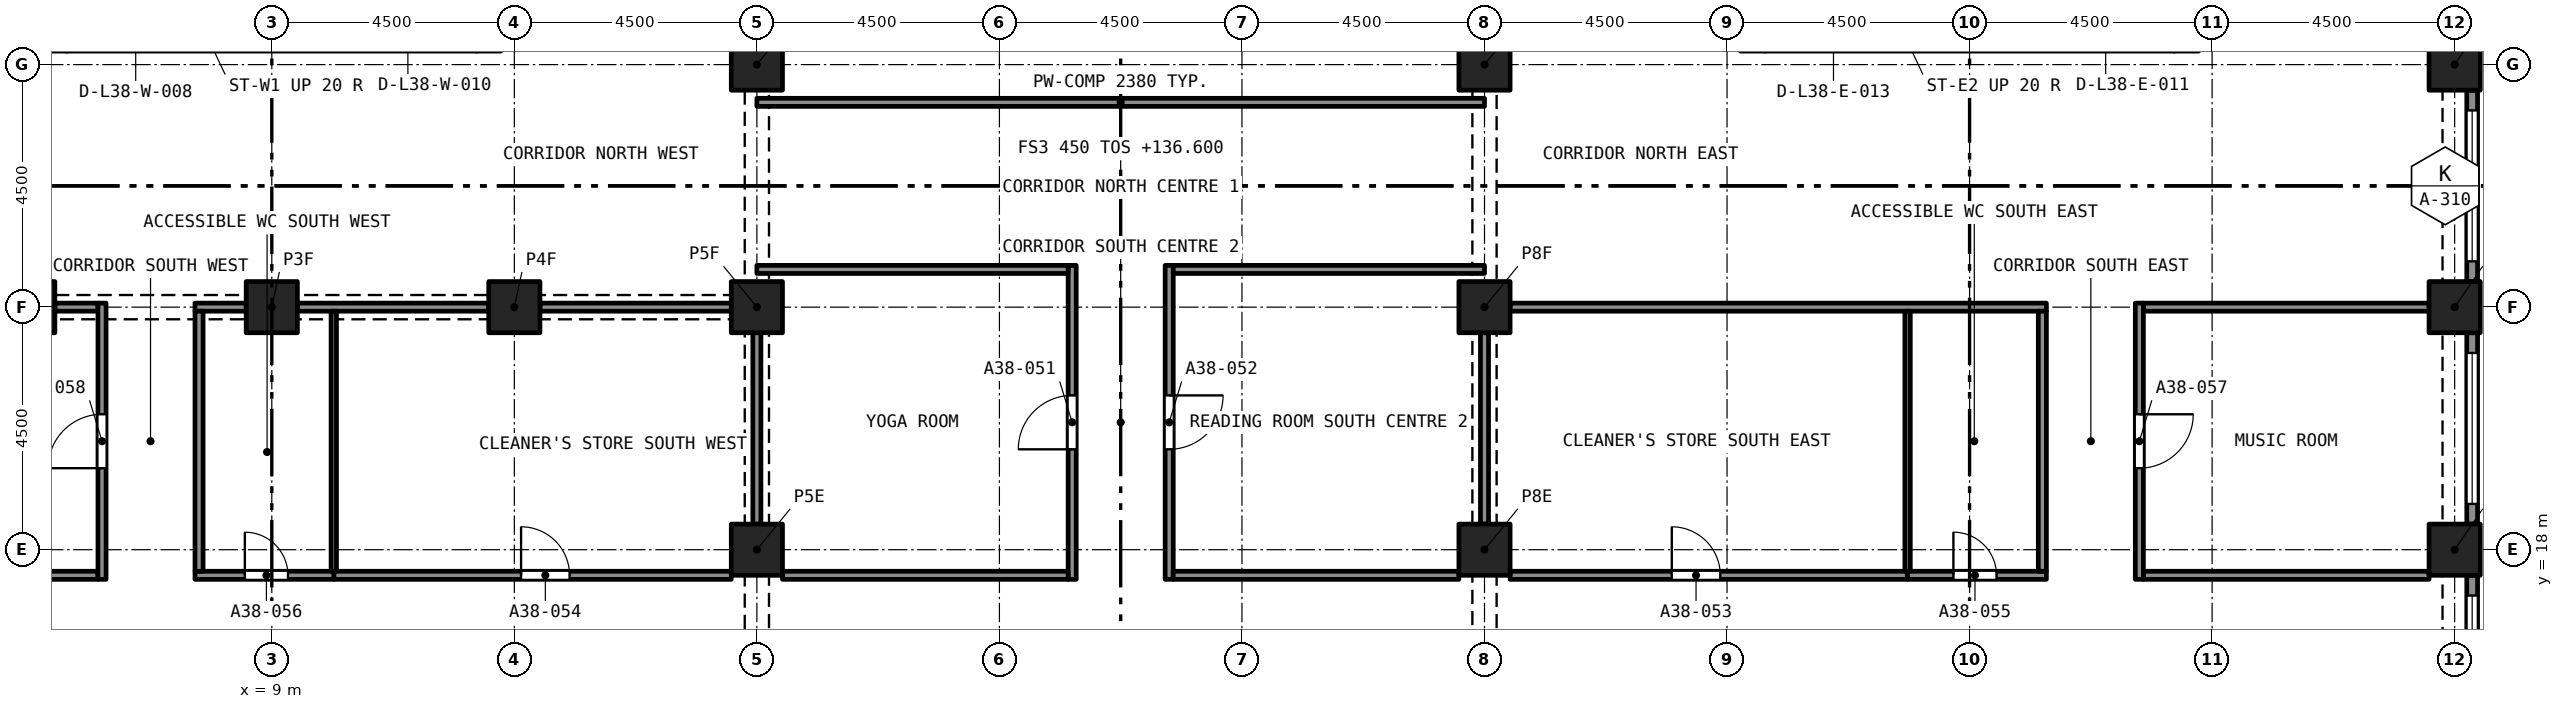
"""IFC4 building model, lengths in metres.
Left out: names, types, materials, properties, quantities, classifications, styles, units other than length and angle.
Written with IfcOpenShell. Run it as: python <this file> out.ifc"""

import sys

from ifc_helpers import new_model, si_unit, direction, frame, frame_2d, origin, origin_2d, place, context, subcontext, project, spatial, rectangle, extrude, element, fill, save


model = new_model("IFC4")
c1 = context("Model", 3, precision=1e-05, world=origin(), true_north=direction((0.0, 1.0)))
c2 = subcontext(c1, "Body", "Model", "MODEL_VIEW")
j1 = project(units=[si_unit("LENGTHUNIT", "METRE"), si_unit("PLANEANGLEUNIT", "RADIAN")], contexts=[c1])
p1 = place(None, origin())
s1 = spatial("IfcSite", under=j1, at=p1, CompositionType="ELEMENT")
p2 = place(p1, origin())
s2 = spatial("IfcBuilding", under=s1, at=p2, CompositionType="ELEMENT")
p3 = place(p2, frame((0.0, 0.0, 136.6)))
s3 = spatial("IfcBuildingStorey", under=s2, at=p3, CompositionType="ELEMENT", Elevation=136.6)
for number, where, z_axis, x_axis in (
    (1, (18.0, 18.0, 0.0), (0.0, 0.0, 1.0), (1.0, 0.0, 0.0)),
    (2, (31.5, 18.0, 0.0), (0.0, 0.0, 1.0), (1.0, 0.0, 0.0)),
    (3, (49.5, 18.0, 0.0), (0.0, 0.0, 1.0), (1.0, 0.0, 0.0)),
    (4, (4.5, 22.5, 0.0), (0.0, 0.0, 1.0), (1.0, 0.0, 0.0)),
    (5, (9.0, 22.5, 0.0), (0.0, 0.0, 1.0), (1.0, 0.0, 0.0)),
    (6, (13.5, 22.5, 0.0), (0.0, 0.0, 1.0), (1.0, 0.0, 0.0)),
    (7, (18.0, 22.5, 0.0), (0.0, 0.0, 1.0), (1.0, 0.0, 0.0)),
    (8, (31.5, 22.5, 0.0), (0.0, 0.0, 1.0), (1.0, 0.0, 0.0)),
    (9, (49.5, 22.5, 0.0), (0.0, 0.0, 1.0), (1.0, 0.0, 0.0)),
    (10, (18.0, 27.0, 0.0), (0.0, 0.0, 1.0), (1.0, 0.0, 0.0)),
    (11, (31.5, 27.0, 0.0), (0.0, 0.0, 1.0), (1.0, 0.0, 0.0)),
    (12, (49.5, 27.0, 0.0), (0.0, 0.0, 1.0), (1.0, 0.0, 0.0)),
):
    element("IfcColumn", number, at=place(p3, frame(where, z_axis=z_axis, x_axis=x_axis)), inside=s3, PredefinedType="COLUMN", context=c2, shape_type="SweptSolid", body=[
        extrude(rectangle(XDim=0.95, YDim=0.95, at=origin_2d()), origin(), (0.0, 0.0, 1.0), 3.2),
    ])
p4 = place(p3, frame((49.825, 17.525, 0.0), z_axis=(0.0, 0.0, 1.0), x_axis=(0.0, -1.0, 0.0)))
e13 = element("IfcWall", 13, at=p4, inside=s3, PredefinedType="SOLIDWALL", context=c2, shape_type="SweptSolid", body=[
    extrude(rectangle(XDim=3.55, YDim=0.2, at=frame_2d((1.775, 0.0))), origin(), (0.0, 0.0, 1.0), 3.2),
])
p5 = place(p4, frame((0.375, 0.0, 0.45)))
e14 = element("IfcOpeningElement", 14, at=p5, cuts=e13, PredefinedType="OPENING", context=c2, shape_type="SweptSolid", body=[
    extrude(rectangle(XDim=2.8, YDim=1.95, at=frame_2d((1.4, 0.975))), frame((0.0, 0.11, 0.0), z_axis=(0.0, -1.0, 0.0), x_axis=(1.0, 0.0, 0.0)), (0.0, 0.0, 1.0), 0.22),
])
p6 = place(p3, frame((49.825, 22.025, 0.0), z_axis=(0.0, 0.0, 1.0), x_axis=(0.0, -1.0, 0.0)))
e15 = element("IfcWall", 15, at=p6, inside=s3, PredefinedType="SOLIDWALL", context=c2, shape_type="SweptSolid", body=[
    extrude(rectangle(XDim=3.55, YDim=0.2, at=frame_2d((1.775, 0.0))), origin(), (0.0, 0.0, 1.0), 3.2),
])
p7 = place(p6, frame((0.375, 0.0, 0.45)))
e16 = element("IfcOpeningElement", 16, at=p7, cuts=e15, PredefinedType="OPENING", context=c2, shape_type="SweptSolid", body=[
    extrude(rectangle(XDim=2.8, YDim=1.95, at=frame_2d((1.4, 0.975))), frame((0.0, 0.11, 0.0), z_axis=(0.0, -1.0, 0.0), x_axis=(1.0, 0.0, 0.0)), (0.0, 0.0, 1.0), 0.22),
])
p8 = place(p3, frame((49.825, 26.525, 0.0), z_axis=(0.0, 0.0, 1.0), x_axis=(0.0, -1.0, 0.0)))
e17 = element("IfcWall", 17, at=p8, inside=s3, PredefinedType="SOLIDWALL", context=c2, shape_type="SweptSolid", body=[
    extrude(rectangle(XDim=3.55, YDim=0.2, at=frame_2d((1.775, 0.0))), origin(), (0.0, 0.0, 1.0), 3.2),
])
p9 = place(p8, frame((0.375, 0.0, 0.45)))
e18 = element("IfcOpeningElement", 18, at=p9, cuts=e17, PredefinedType="OPENING", context=c2, shape_type="SweptSolid", body=[
    extrude(rectangle(XDim=2.8, YDim=1.95, at=frame_2d((1.4, 0.975))), frame((0.0, 0.11, 0.0), z_axis=(0.0, -1.0, 0.0), x_axis=(1.0, 0.0, 0.0)), (0.0, 0.0, 1.0), 0.22),
])
p10 = place(p3, frame((23.85, 17.45, 0.0), z_axis=(0.0, 0.0, 1.0), x_axis=(0.0, 1.0, 0.0)))
e19 = element("IfcWall", 19, at=p10, inside=s3, PredefinedType="PARTITIONING", context=c2, shape_type="SweptSolid", body=[
    extrude(rectangle(XDim=5.825, YDim=0.15, at=frame_2d((2.913, 0.0))), origin(), (0.0, 0.0, 1.0), 2.75),
])
p11 = place(p10, frame((2.413, 0.0, 0.0)))
e20 = element("IfcOpeningElement", 20, at=p11, cuts=e19, PredefinedType="OPENING", context=c2, shape_type="SweptSolid", body=[
    extrude(rectangle(XDim=1.0, YDim=2.1, at=frame_2d((0.5, 1.05))), frame((0.0, 0.085, 0.0), z_axis=(0.0, -1.0, 0.0), x_axis=(1.0, 0.0, 0.0)), (0.0, 0.0, 1.0), 0.17),
])
p12 = place(p3, frame((25.65, 23.275, 0.0), z_axis=(0.0, 0.0, 1.0), x_axis=(0.0, -1.0, 0.0)))
e21 = element("IfcWall", 21, at=p12, inside=s3, PredefinedType="PARTITIONING", context=c2, shape_type="SweptSolid", body=[
    extrude(rectangle(XDim=5.825, YDim=0.15, at=frame_2d((2.913, 0.0))), origin(), (0.0, 0.0, 1.0), 2.75),
])
p13 = place(p12, frame((2.413, 0.0, 0.0)))
e22 = element("IfcOpeningElement", 22, at=p13, cuts=e21, PredefinedType="OPENING", context=c2, shape_type="SweptSolid", body=[
    extrude(rectangle(XDim=1.0, YDim=2.1, at=frame_2d((0.5, 1.05))), frame((0.0, 0.085, 0.0), z_axis=(0.0, -1.0, 0.0), x_axis=(1.0, 0.0, 0.0)), (0.0, 0.0, 1.0), 0.17),
])
for number, where, z_axis, x_axis in (
    (23, (18.475, 17.525, 0.0), (0.0, 0.0, 1.0), (1.0, 0.0, 0.0)),
    (24, (25.725, 17.525, 0.0), (0.0, 0.0, 1.0), (1.0, 0.0, 0.0)),
):
    element("IfcWall", number, at=place(p3, frame(where, z_axis=z_axis, x_axis=x_axis)), inside=s3, PredefinedType="PARTITIONING", context=c2, shape_type="SweptSolid", body=[
        extrude(rectangle(XDim=5.3, YDim=0.15, at=frame_2d((2.65, 0.0))), origin(), (0.0, 0.0, 1.0), 2.75),
    ])
p14 = place(p3, frame((31.975, 17.525, 0.0), z_axis=(0.0, 0.0, 1.0), x_axis=(1.0, 0.0, 0.0)))
e25 = element("IfcWall", 25, at=p14, inside=s3, PredefinedType="PARTITIONING", context=c2, shape_type="SweptSolid", body=[
    extrude(rectangle(XDim=7.375, YDim=0.15, at=frame_2d((3.688, 0.0))), origin(), (0.0, 0.0, 1.0), 2.9),
])
p15 = place(p14, frame((3.0, 0.0, 0.0)))
e26 = element("IfcOpeningElement", 26, at=p15, cuts=e25, PredefinedType="OPENING", context=c2, shape_type="SweptSolid", body=[
    extrude(rectangle(XDim=0.9, YDim=2.1, at=frame_2d((0.45, 1.05))), frame((0.0, 0.085, 0.0), z_axis=(0.0, -1.0, 0.0), x_axis=(1.0, 0.0, 0.0)), (0.0, 0.0, 1.0), 0.17),
])
p16 = place(p3, frame((10.15, 17.525, 0.0), z_axis=(0.0, 0.0, 1.0), x_axis=(1.0, 0.0, 0.0)))
e27 = element("IfcWall", 27, at=p16, inside=s3, PredefinedType="PARTITIONING", context=c2, shape_type="SweptSolid", body=[
    extrude(rectangle(XDim=7.375, YDim=0.15, at=frame_2d((3.688, 0.0))), origin(), (0.0, 0.0, 1.0), 2.9),
])
p17 = place(p16, frame((3.475, 0.0, 0.0)))
e28 = element("IfcOpeningElement", 28, at=p17, cuts=e27, PredefinedType="OPENING", context=c2, shape_type="SweptSolid", body=[
    extrude(rectangle(XDim=0.9, YDim=2.1, at=frame_2d((0.45, 1.05))), frame((0.0, 0.085, 0.0), z_axis=(0.0, -1.0, 0.0), x_axis=(1.0, 0.0, 0.0)), (0.0, 0.0, 1.0), 0.17),
])
p18 = place(p3, frame((39.35, 17.525, 0.0), z_axis=(0.0, 0.0, 1.0), x_axis=(1.0, 0.0, 0.0)))
e29 = element("IfcWall", 29, at=p18, inside=s3, PredefinedType="PARTITIONING", context=c2, shape_type="SweptSolid", body=[
    extrude(rectangle(XDim=2.575, YDim=0.15, at=frame_2d((1.288, 0.0))), origin(), (0.0, 0.0, 1.0), 2.9),
])
p19 = place(p18, frame((0.85, 0.0, 0.0)))
e30 = element("IfcOpeningElement", 30, at=p19, cuts=e29, PredefinedType="OPENING", context=c2, shape_type="SweptSolid", body=[
    extrude(rectangle(XDim=0.8, YDim=2.1, at=frame_2d((0.4, 1.05))), frame((0.0, 0.085, 0.0), z_axis=(0.0, -1.0, 0.0), x_axis=(1.0, 0.0, 0.0)), (0.0, 0.0, 1.0), 0.17),
])
p20 = place(p3, frame((7.575, 17.525, 0.0), z_axis=(0.0, 0.0, 1.0), x_axis=(1.0, 0.0, 0.0)))
e31 = element("IfcWall", 31, at=p20, inside=s3, PredefinedType="PARTITIONING", context=c2, shape_type="SweptSolid", body=[
    extrude(rectangle(XDim=2.575, YDim=0.15, at=frame_2d((1.288, 0.0))), origin(), (0.0, 0.0, 1.0), 2.9),
])
p21 = place(p20, frame((0.925, 0.0, 0.0)))
e32 = element("IfcOpeningElement", 32, at=p21, cuts=e31, PredefinedType="OPENING", context=c2, shape_type="SweptSolid", body=[
    extrude(rectangle(XDim=0.8, YDim=2.1, at=frame_2d((0.4, 1.05))), frame((0.0, 0.085, 0.0), z_axis=(0.0, -1.0, 0.0), x_axis=(1.0, 0.0, 0.0)), (0.0, 0.0, 1.0), 0.17),
])
for number, where, z_axis, x_axis in (
    (33, (43.725, 17.525, 0.0), (0.0, 0.0, 1.0), (1.0, 0.0, 0.0)),
    (34, (0.475, 17.525, 0.0), (0.0, 0.0, 1.0), (1.0, 0.0, 0.0)),
):
    element("IfcWall", number, at=place(p3, frame(where, z_axis=z_axis, x_axis=x_axis)), inside=s3, PredefinedType="PARTITIONING", context=c2, shape_type="SweptSolid", body=[
        extrude(rectangle(XDim=5.3, YDim=0.15, at=frame_2d((2.65, 0.0))), origin(), (0.0, 0.0, 1.0), 2.9),
    ])
p22 = place(p3, frame((18.0, 26.3, 0.0), z_axis=(0.0, 0.0, 1.0), x_axis=(1.0, 0.0, 0.0)))
e35 = element("IfcWall", 35, at=p22, inside=s3, PredefinedType="PARTITIONING", context=c2, shape_type="SweptSolid", body=[
    extrude(rectangle(XDim=13.5, YDim=0.15, at=frame_2d((6.75, 0.0))), origin(), (0.0, 0.0, 1.0), 2.38),
])
p23 = place(p3, frame((18.0, 23.2, 0.0), z_axis=(0.0, 0.0, 1.0), x_axis=(1.0, 0.0, 0.0)))
e36 = element("IfcWall", 36, at=p23, inside=s3, PredefinedType="PARTITIONING", context=c2, shape_type="SweptSolid", body=[
    extrude(rectangle(XDim=5.775, YDim=0.15, at=frame_2d((2.887, 0.0))), origin(), (0.0, 0.0, 1.0), 2.75),
])
p24 = place(p3, frame((18.0, 18.475, 0.0), z_axis=(0.0, 0.0, 1.0), x_axis=(0.0, 1.0, 0.0)))
e37 = element("IfcWall", 37, at=p24, inside=s3, PredefinedType="PARTITIONING", context=c2, shape_type="SweptSolid", body=[
    extrude(rectangle(XDim=3.55, YDim=0.15, at=frame_2d((1.775, 0.0))), origin(), (0.0, 0.0, 1.0), 2.38),
])
p25 = place(p3, frame((25.725, 23.2, 0.0), z_axis=(0.0, 0.0, 1.0), x_axis=(1.0, 0.0, 0.0)))
e38 = element("IfcWall", 38, at=p25, inside=s3, PredefinedType="PARTITIONING", context=c2, shape_type="SweptSolid", body=[
    extrude(rectangle(XDim=5.775, YDim=0.15, at=frame_2d((2.887, 0.0))), origin(), (0.0, 0.0, 1.0), 2.75),
])
p26 = place(p3, frame((31.5, 18.475, 0.0), z_axis=(0.0, 0.0, 1.0), x_axis=(0.0, 1.0, 0.0)))
e39 = element("IfcWall", 39, at=p26, inside=s3, PredefinedType="PARTITIONING", context=c2, shape_type="SweptSolid", body=[
    extrude(rectangle(XDim=3.55, YDim=0.15, at=frame_2d((1.775, 0.0))), origin(), (0.0, 0.0, 1.0), 2.38),
])
p27 = place(p3, frame((31.975, 22.5, 0.0), z_axis=(0.0, 0.0, 1.0), x_axis=(1.0, 0.0, 0.0)))
e40 = element("IfcWall", 40, at=p27, inside=s3, PredefinedType="PARTITIONING", context=c2, shape_type="SweptSolid", body=[
    extrude(rectangle(XDim=9.95, YDim=0.15, at=frame_2d((4.975, 0.0))), origin(), (0.0, 0.0, 1.0), 2.9),
])
p28 = place(p3, frame((43.725, 22.5, 0.0), z_axis=(0.0, 0.0, 1.0), x_axis=(1.0, 0.0, 0.0)))
e41 = element("IfcWall", 41, at=p28, inside=s3, PredefinedType="PARTITIONING", context=c2, shape_type="SweptSolid", body=[
    extrude(rectangle(XDim=5.3, YDim=0.15, at=frame_2d((2.65, 0.0))), origin(), (0.0, 0.0, 1.0), 2.9),
])
for number, where, z_axis, x_axis in (
    (42, (13.975, 22.5, 0.0), (0.0, 0.0, 1.0), (1.0, 0.0, 0.0)),
    (43, (9.475, 22.5, 0.0), (0.0, 0.0, 1.0), (1.0, 0.0, 0.0)),
):
    element("IfcWall", number, at=place(p3, frame(where, z_axis=z_axis, x_axis=x_axis)), inside=s3, PredefinedType="PARTITIONING", context=c2, shape_type="SweptSolid", body=[
        extrude(rectangle(XDim=3.55, YDim=0.15, at=frame_2d((1.775, 0.0))), origin(), (0.0, 0.0, 1.0), 2.38),
    ])
p29 = place(p3, frame((7.575, 22.5, 0.0), z_axis=(0.0, 0.0, 1.0), x_axis=(1.0, 0.0, 0.0)))
e44 = element("IfcWall", 44, at=p29, inside=s3, PredefinedType="PARTITIONING", context=c2, shape_type="SweptSolid", body=[
    extrude(rectangle(XDim=0.95, YDim=0.15, at=frame_2d((0.475, 0.0))), origin(), (0.0, 0.0, 1.0), 2.38),
])
p30 = place(p3, frame((4.975, 22.5, 0.0), z_axis=(0.0, 0.0, 1.0), x_axis=(1.0, 0.0, 0.0)))
e45 = element("IfcWall", 45, at=p30, inside=s3, PredefinedType="PARTITIONING", context=c2, shape_type="SweptSolid", body=[
    extrude(rectangle(XDim=0.8, YDim=0.15, at=frame_2d((0.4, 0.0))), origin(), (0.0, 0.0, 1.0), 2.38),
])
p31 = place(p3, frame((41.85, 17.6, 0.0), z_axis=(0.0, 0.0, 1.0), x_axis=(0.0, 1.0, 0.0)))
e46 = element("IfcWall", 46, at=p31, inside=s3, PredefinedType="PARTITIONING", context=c2, shape_type="SweptSolid", body=[
    extrude(rectangle(XDim=4.825, YDim=0.15, at=frame_2d((2.413, 0.0))), origin(), (0.0, 0.0, 1.0), 2.9),
])
p32 = place(p3, frame((43.65, 22.575, 0.0), z_axis=(0.0, 0.0, 1.0), x_axis=(0.0, -1.0, 0.0)))
e47 = element("IfcWall", 47, at=p32, inside=s3, PredefinedType="PARTITIONING", context=c2, shape_type="SweptSolid", body=[
    extrude(rectangle(XDim=5.125, YDim=0.15, at=frame_2d((2.562, 0.0))), origin(), (0.0, 0.0, 1.0), 2.9),
])
p33 = place(p32, frame((2.062, 0.0, 0.0)))
e48 = element("IfcOpeningElement", 48, at=p33, cuts=e47, PredefinedType="OPENING", context=c2, shape_type="SweptSolid", body=[
    extrude(rectangle(XDim=1.0, YDim=2.1, at=frame_2d((0.5, 1.05))), frame((0.0, 0.085, 0.0), z_axis=(0.0, -1.0, 0.0), x_axis=(1.0, 0.0, 0.0)), (0.0, 0.0, 1.0), 0.17),
])
p34 = place(p3, frame((7.65, 17.6, 0.0), z_axis=(0.0, 0.0, 1.0), x_axis=(0.0, 1.0, 0.0)))
e49 = element("IfcWall", 49, at=p34, inside=s3, PredefinedType="PARTITIONING", context=c2, shape_type="SweptSolid", body=[
    extrude(rectangle(XDim=4.825, YDim=0.15, at=frame_2d((2.413, 0.0))), origin(), (0.0, 0.0, 1.0), 2.9),
])
p35 = place(p3, frame((5.85, 17.45, 0.0), z_axis=(0.0, 0.0, 1.0), x_axis=(0.0, 1.0, 0.0)))
e50 = element("IfcWall", 50, at=p35, inside=s3, PredefinedType="PARTITIONING", context=c2, shape_type="SweptSolid", body=[
    extrude(rectangle(XDim=5.125, YDim=0.15, at=frame_2d((2.562, 0.0))), origin(), (0.0, 0.0, 1.0), 2.9),
])
p36 = place(p35, frame((2.062, 0.0, 0.0)))
e51 = element("IfcOpeningElement", 51, at=p36, cuts=e50, PredefinedType="OPENING", context=c2, shape_type="SweptSolid", body=[
    extrude(rectangle(XDim=1.0, YDim=2.1, at=frame_2d((0.5, 1.05))), frame((0.0, 0.085, 0.0), z_axis=(0.0, -1.0, 0.0), x_axis=(1.0, 0.0, 0.0)), (0.0, 0.0, 1.0), 0.17),
])
for number, where, z_axis, x_axis in (
    (52, (39.35, 17.6, 0.0), (0.0, 0.0, 1.0), (0.0, 1.0, 0.0)),
    (53, (10.15, 17.6, 0.0), (0.0, 0.0, 1.0), (0.0, 1.0, 0.0)),
):
    element("IfcWall", number, at=place(p3, frame(where, z_axis=z_axis, x_axis=x_axis)), inside=s3, PredefinedType="PARTITIONING", context=c2, shape_type="SweptSolid", body=[
        extrude(rectangle(XDim=4.825, YDim=0.1, at=frame_2d((2.413, 0.0))), origin(), (0.0, 0.0, 1.0), 2.9),
    ])
p37 = place(p5, origin())
e54 = element("IfcWindow", 54, at=p37, inside=s3, PartitioningType="SINGLE_PANEL", PredefinedType="WINDOW", context=c2, shape_type="SweptSolid", body=[
    extrude(rectangle(XDim=2.8, YDim=1.95, at=frame_2d((1.4, 0.975))), frame((0.0, 0.03, 0.0), z_axis=(0.0, -1.0, 0.0), x_axis=(1.0, 0.0, 0.0)), (0.0, 0.0, 1.0), 0.06),
])
fill(e14, e54)
p38 = place(p7, origin())
e55 = element("IfcWindow", 55, at=p38, inside=s3, PartitioningType="SINGLE_PANEL", PredefinedType="WINDOW", context=c2, shape_type="SweptSolid", body=[
    extrude(rectangle(XDim=2.8, YDim=1.95, at=frame_2d((1.4, 0.975))), frame((0.0, 0.03, 0.0), z_axis=(0.0, -1.0, 0.0), x_axis=(1.0, 0.0, 0.0)), (0.0, 0.0, 1.0), 0.06),
])
fill(e16, e55)
p39 = place(p9, origin())
e56 = element("IfcWindow", 56, at=p39, inside=s3, PartitioningType="SINGLE_PANEL", PredefinedType="WINDOW", context=c2, shape_type="SweptSolid", body=[
    extrude(rectangle(XDim=2.8, YDim=1.95, at=frame_2d((1.4, 0.975))), frame((0.0, 0.03, 0.0), z_axis=(0.0, -1.0, 0.0), x_axis=(1.0, 0.0, 0.0)), (0.0, 0.0, 1.0), 0.06),
])
fill(e18, e56)
p40 = place(p11, origin())
e57 = element("IfcDoor", 57, at=p40, inside=s3, OperationType="SINGLE_SWING_LEFT", PredefinedType="DOOR", context=c2, shape_type="SweptSolid", body=[
    extrude(rectangle(XDim=1.0, YDim=2.1, at=frame_2d((0.5, 1.05))), frame((0.0, 0.025, 0.0), z_axis=(0.0, -1.0, 0.0), x_axis=(1.0, 0.0, 0.0)), (0.0, 0.0, 1.0), 0.05),
])
fill(e20, e57)
p41 = place(p13, origin())
e58 = element("IfcDoor", 58, at=p41, inside=s3, OperationType="SINGLE_SWING_RIGHT", PredefinedType="DOOR", context=c2, shape_type="SweptSolid", body=[
    extrude(rectangle(XDim=1.0, YDim=2.1, at=frame_2d((0.5, 1.05))), frame((0.0, 0.025, 0.0), z_axis=(0.0, -1.0, 0.0), x_axis=(1.0, 0.0, 0.0)), (0.0, 0.0, 1.0), 0.05),
])
fill(e22, e58)
p42 = place(p15, origin())
e59 = element("IfcDoor", 59, at=p42, inside=s3, OperationType="SINGLE_SWING_LEFT", PredefinedType="DOOR", context=c2, shape_type="SweptSolid", body=[
    extrude(rectangle(XDim=0.9, YDim=2.1, at=frame_2d((0.45, 1.05))), frame((0.0, 0.025, 0.0), z_axis=(0.0, -1.0, 0.0), x_axis=(1.0, 0.0, 0.0)), (0.0, 0.0, 1.0), 0.05),
])
fill(e26, e59)
p43 = place(p17, origin())
e60 = element("IfcDoor", 60, at=p43, inside=s3, OperationType="SINGLE_SWING_RIGHT", PredefinedType="DOOR", context=c2, shape_type="SweptSolid", body=[
    extrude(rectangle(XDim=0.9, YDim=2.1, at=frame_2d((0.45, 1.05))), frame((0.0, 0.025, 0.0), z_axis=(0.0, -1.0, 0.0), x_axis=(1.0, 0.0, 0.0)), (0.0, 0.0, 1.0), 0.05),
])
fill(e28, e60)
p44 = place(p19, origin())
e61 = element("IfcDoor", 61, at=p44, inside=s3, OperationType="SINGLE_SWING_LEFT", PredefinedType="DOOR", context=c2, shape_type="SweptSolid", body=[
    extrude(rectangle(XDim=0.8, YDim=2.1, at=frame_2d((0.4, 1.05))), frame((0.0, 0.025, 0.0), z_axis=(0.0, -1.0, 0.0), x_axis=(1.0, 0.0, 0.0)), (0.0, 0.0, 1.0), 0.05),
])
fill(e30, e61)
p45 = place(p21, origin())
e62 = element("IfcDoor", 62, at=p45, inside=s3, OperationType="SINGLE_SWING_RIGHT", PredefinedType="DOOR", context=c2, shape_type="SweptSolid", body=[
    extrude(rectangle(XDim=0.8, YDim=2.1, at=frame_2d((0.4, 1.05))), frame((0.0, 0.025, 0.0), z_axis=(0.0, -1.0, 0.0), x_axis=(1.0, 0.0, 0.0)), (0.0, 0.0, 1.0), 0.05),
])
fill(e32, e62)
p46 = place(p33, origin())
e63 = element("IfcDoor", 63, at=p46, inside=s3, OperationType="SINGLE_SWING_RIGHT", PredefinedType="DOOR", context=c2, shape_type="SweptSolid", body=[
    extrude(rectangle(XDim=1.0, YDim=2.1, at=frame_2d((0.5, 1.05))), frame((0.0, 0.025, 0.0), z_axis=(0.0, -1.0, 0.0), x_axis=(1.0, 0.0, 0.0)), (0.0, 0.0, 1.0), 0.05),
])
fill(e48, e63)
p47 = place(p36, origin())
e64 = element("IfcDoor", 64, at=p47, inside=s3, OperationType="SINGLE_SWING_RIGHT", PredefinedType="DOOR", context=c2, shape_type="SweptSolid", body=[
    extrude(rectangle(XDim=1.0, YDim=2.1, at=frame_2d((0.5, 1.05))), frame((0.0, 0.025, 0.0), z_axis=(0.0, -1.0, 0.0), x_axis=(1.0, 0.0, 0.0)), (0.0, 0.0, 1.0), 0.05),
])
fill(e51, e64)
save(model, sys.argv[1])
